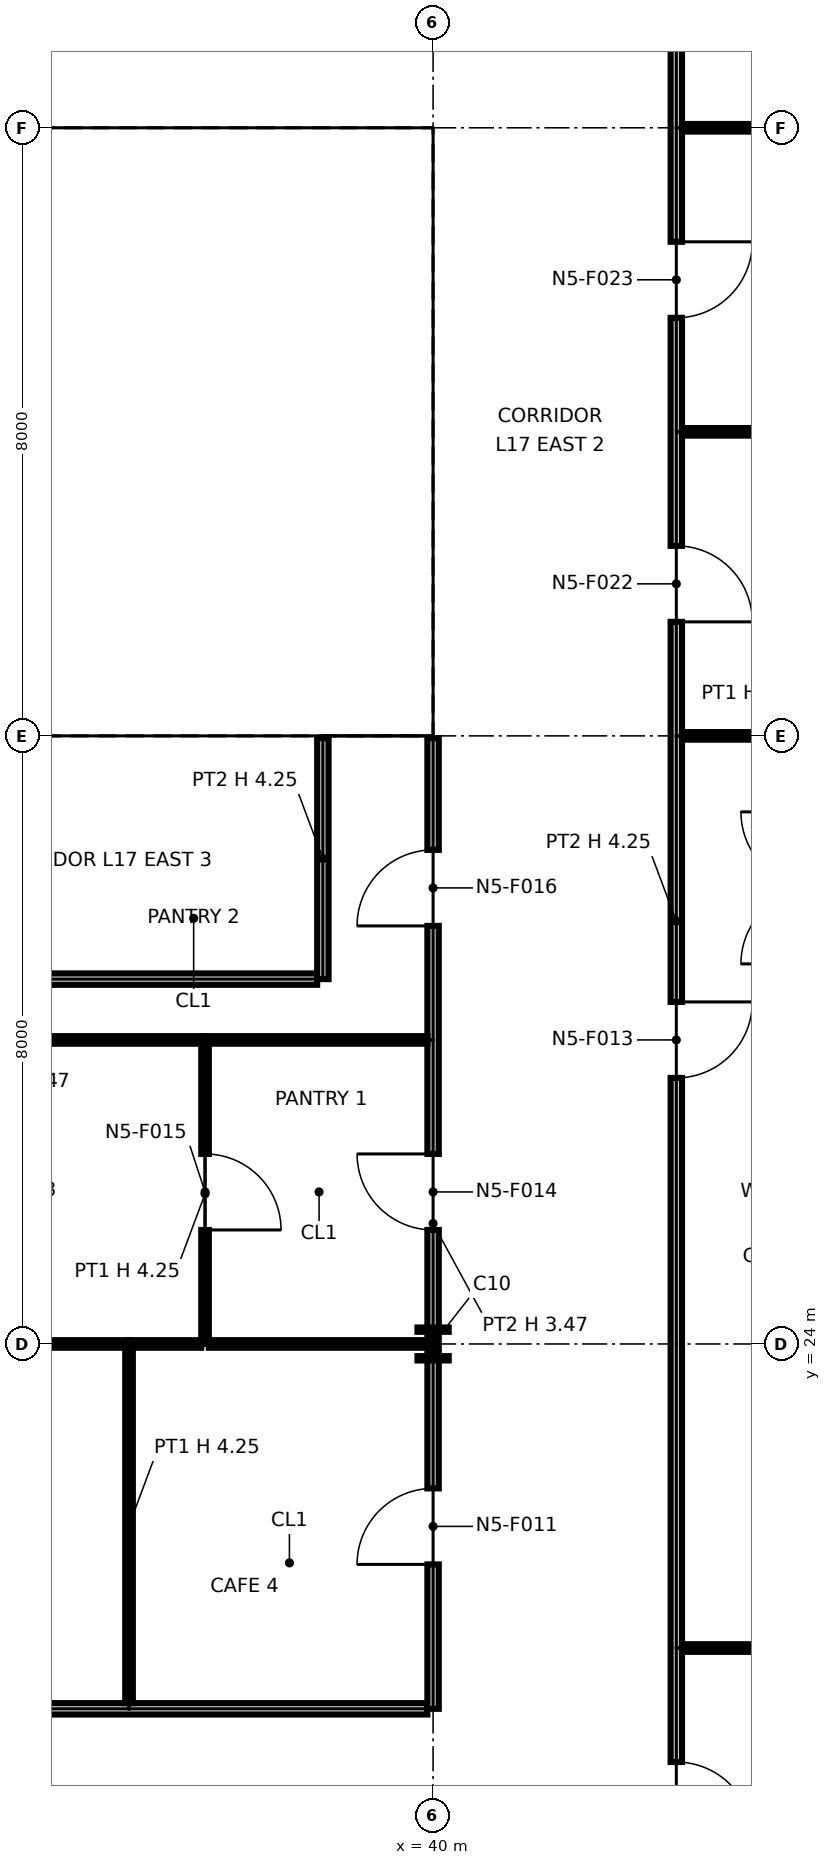
"""IFC4 building model, lengths in metres.
Left out: names, types, materials, properties, quantities, classifications, styles, units other than length and angle.
Written with IfcOpenShell. Run it as: python <this file> out.ifc"""

import sys

from ifc_helpers import new_model, si_unit, direction, frame, frame_2d, origin, origin_2d, place, context, subcontext, project, spatial, polyline, rectangle, i_section, outline, extrude, element, fill, save


model = new_model("IFC4")
c1 = context("Model", 3, precision=1e-05, world=origin(), true_north=direction((0.0, 1.0)))
c2 = subcontext(c1, "Body", "Model", "MODEL_VIEW")
j1 = project(units=[si_unit("LENGTHUNIT", "METRE"), si_unit("PLANEANGLEUNIT", "RADIAN")], contexts=[c1])
p1 = place(None, origin())
s1 = spatial("IfcSite", under=j1, at=p1, CompositionType="ELEMENT")
p2 = place(p1, origin())
s2 = spatial("IfcBuilding", under=s1, at=p2, CompositionType="ELEMENT")
p3 = place(p2, frame((0.0, 0.0, 92.0)))
s3 = spatial("IfcBuildingStorey", under=s2, at=p3, CompositionType="ELEMENT", Elevation=92.0)
p4 = place(p3, frame((40.0, 24.0, 0.0), z_axis=(0.0, 0.0, 1.0), x_axis=(1.0, 0.0, 0.0)))
e1 = element("IfcColumn", 1, at=p4, inside=s3, PredefinedType="COLUMN", context=c2, shape_type="SweptSolid", body=[
    extrude(i_section(OverallWidth=0.411, OverallDepth=0.434, WebThickness=0.036, FlangeThickness=0.057, at=origin_2d()), origin(), (0.0, 0.0, 1.0), 4.25),
])
for number, where, z_axis, x_axis in (
    (2, (40.0, 32.0, 0.0), (0.0, 0.0, 1.0), (1.0, 0.0, 0.0)),
    (3, (40.0, 40.0, 0.0), (0.0, 0.0, 1.0), (1.0, 0.0, 0.0)),
):
    element("IfcColumn", number, at=place(p3, frame(where, z_axis=z_axis, x_axis=x_axis)), inside=s3, PredefinedType="COLUMN", context=c2, shape_type="SweptSolid", body=[
        extrude(i_section(OverallWidth=0.257, OverallDepth=0.363, WebThickness=0.013, FlangeThickness=0.022, at=origin_2d()), origin(), (0.0, 0.0, 1.0), 4.25),
    ])
p5 = place(p3, frame((24.65, 32.75, 0.0), z_axis=(0.0, 0.0, 1.0), x_axis=(1.0, 0.0, 0.0)))
e4 = element("IfcWall", 4, at=p5, inside=s3, PredefinedType="PARTITIONING", context=c2, shape_type="SweptSolid", body=[
    extrude(outline(polyline([(0.0, 0.0), (14.7, 0.0), (14.7, 4.25), (7.469, 4.25), (7.469, 3.632), (7.231, 3.632), (7.23, 4.25), (0.0, 4.25), (0.0, 0.0)])), frame((0.0, 0.1, 0.0), z_axis=(0.0, -1.0, 0.0), x_axis=(1.0, 0.0, 0.0)), (0.0, 0.0, 1.0), 0.2),
])
p6 = place(p5, frame((4.1, 0.0, 0.0)))
e5 = element("IfcOpeningElement", 5, at=p6, cuts=e4, PredefinedType="OPENING", context=c2, shape_type="SweptSolid", body=[
    extrude(rectangle(XDim=1.8, YDim=2.1, at=frame_2d((0.9, 1.05))), frame((0.0, 0.11, 0.0), z_axis=(0.0, -1.0, 0.0), x_axis=(1.0, 0.0, 0.0)), (0.0, 0.0, 1.0), 0.22),
])
p7 = place(p5, frame((8.55, 0.0, 0.0)))
e6 = element("IfcOpeningElement", 6, at=p7, cuts=e4, PredefinedType="OPENING", context=c2, shape_type="SweptSolid", body=[
    extrude(rectangle(XDim=1.4, YDim=2.1, at=frame_2d((0.7, 1.05))), frame((0.0, 0.11, 0.0), z_axis=(0.0, -1.0, 0.0), x_axis=(1.0, 0.0, 0.0)), (0.0, 0.0, 1.0), 0.22),
])
p8 = place(p5, frame((12.0, 0.0, 0.0)))
e7 = element("IfcOpeningElement", 7, at=p8, cuts=e4, PredefinedType="OPENING", context=c2, shape_type="SweptSolid", body=[
    extrude(rectangle(XDim=1.4, YDim=2.1, at=frame_2d((0.7, 1.05))), frame((0.0, 0.11, 0.0), z_axis=(0.0, -1.0, 0.0), x_axis=(1.0, 0.0, 0.0)), (0.0, 0.0, 1.0), 0.22),
])
p9 = place(p3, frame((24.65, 39.25, 0.0), z_axis=(0.0, 0.0, 1.0), x_axis=(1.0, 0.0, 0.0)))
e8 = element("IfcWall", 8, at=p9, inside=s3, PredefinedType="PARTITIONING", context=c2, shape_type="SweptSolid", body=[
    extrude(outline(polyline([(0.0, 0.0), (14.7, 0.0), (14.7, 4.25), (7.469, 4.25), (7.469, 3.632), (7.231, 3.632), (7.23, 4.25), (0.0, 4.25), (0.0, 0.0)])), frame((0.0, 0.1, 0.0), z_axis=(0.0, -1.0, 0.0), x_axis=(1.0, 0.0, 0.0)), (0.0, 0.0, 1.0), 0.2),
])
for number, where, z_axis, x_axis in (
    (9, (35.6, 32.85, 0.0), (0.0, 0.0, 1.0), (0.0, 1.0, 0.0)),
    (10, (39.25, 32.85, 0.0), (0.0, 0.0, 1.0), (0.0, 1.0, 0.0)),
):
    element("IfcWall", number, at=place(p3, frame(where, z_axis=z_axis, x_axis=x_axis)), inside=s3, PredefinedType="PARTITIONING", context=c2, shape_type="SweptSolid", body=[
        extrude(rectangle(XDim=6.3, YDim=0.2, at=frame_2d((3.15, 0.0))), origin(), (0.0, 0.0, 1.0), 4.25),
    ])
p10 = place(p3, frame((43.2, 16.0, 0.0), z_axis=(0.0, 0.0, 1.0), x_axis=(0.0, 1.0, 0.0)))
e11 = element("IfcWall", 11, at=p10, inside=s3, PredefinedType="PARTITIONING", context=c2, shape_type="SweptSolid", body=[
    extrude(outline(polyline([(0.0, 0.0), (27.125, 0.0), (27.125, 4.25), (24.3, 4.25), (24.298, 3.47), (23.702, 3.47), (23.7, 4.25), (20.3, 4.25), (20.298, 3.47), (19.702, 3.47), (19.7, 4.25), (16.3, 4.25), (16.298, 3.47), (15.702, 3.47), (15.7, 4.25), (12.3, 4.25), (12.298, 3.47), (11.702, 3.47), (11.7, 4.25), (8.3, 4.25), (8.298, 3.47), (7.702, 3.47), (7.7, 4.25), (4.3, 4.25), (4.298, 3.47), (3.702, 3.47), (3.7, 4.25), (0.0, 4.25), (0.0, 0.0)])), frame((0.0, 0.075, 0.0), z_axis=(0.0, -1.0, 0.0), x_axis=(1.0, 0.0, 0.0)), (0.0, 0.0, 1.0), 0.15),
])
p11 = place(p10, frame((2.5, 0.0, 0.0), z_axis=(0.0, 0.0, 1.0), x_axis=(-1.0, 0.0, 0.0)))
e12 = element("IfcOpeningElement", 12, at=p11, cuts=e11, PredefinedType="OPENING", context=c2, shape_type="SweptSolid", body=[
    extrude(rectangle(XDim=1.0, YDim=2.1, at=frame_2d((0.5, 1.05))), frame((0.0, 0.085, 0.0), z_axis=(0.0, -1.0, 0.0), x_axis=(1.0, 0.0, 0.0)), (0.0, 0.0, 1.0), 0.17),
])
p12 = place(p10, frame((12.5, 0.0, 0.0), z_axis=(0.0, 0.0, 1.0), x_axis=(-1.0, 0.0, 0.0)))
e13 = element("IfcOpeningElement", 13, at=p12, cuts=e11, PredefinedType="OPENING", context=c2, shape_type="SweptSolid", body=[
    extrude(rectangle(XDim=1.0, YDim=2.1, at=frame_2d((0.5, 1.05))), frame((0.0, 0.085, 0.0), z_axis=(0.0, -1.0, 0.0), x_axis=(1.0, 0.0, 0.0)), (0.0, 0.0, 1.0), 0.17),
])
p13 = place(p10, frame((18.5, 0.0, 0.0), z_axis=(0.0, 0.0, 1.0), x_axis=(-1.0, 0.0, 0.0)))
e14 = element("IfcOpeningElement", 14, at=p13, cuts=e11, PredefinedType="OPENING", context=c2, shape_type="SweptSolid", body=[
    extrude(rectangle(XDim=1.0, YDim=2.1, at=frame_2d((0.5, 1.05))), frame((0.0, 0.085, 0.0), z_axis=(0.0, -1.0, 0.0), x_axis=(1.0, 0.0, 0.0)), (0.0, 0.0, 1.0), 0.17),
])
p14 = place(p10, frame((22.5, 0.0, 0.0), z_axis=(0.0, 0.0, 1.0), x_axis=(-1.0, 0.0, 0.0)))
e15 = element("IfcOpeningElement", 15, at=p14, cuts=e11, PredefinedType="OPENING", context=c2, shape_type="SweptSolid", body=[
    extrude(rectangle(XDim=1.0, YDim=2.1, at=frame_2d((0.5, 1.05))), frame((0.0, 0.085, 0.0), z_axis=(0.0, -1.0, 0.0), x_axis=(1.0, 0.0, 0.0)), (0.0, 0.0, 1.0), 0.17),
])
p15 = place(p10, frame((26.1, 0.0, 0.0), z_axis=(0.0, 0.0, 1.0), x_axis=(-1.0, 0.0, 0.0)))
e16 = element("IfcOpeningElement", 16, at=p15, cuts=e11, PredefinedType="OPENING", context=c2, shape_type="SweptSolid", body=[
    extrude(rectangle(XDim=1.0, YDim=2.1, at=frame_2d((0.5, 1.05))), frame((0.0, 0.085, 0.0), z_axis=(0.0, -1.0, 0.0), x_axis=(1.0, 0.0, 0.0)), (0.0, 0.0, 1.0), 0.17),
])
p16 = place(p3, frame((27.2, 19.2, 0.0), z_axis=(0.0, 0.0, 1.0), x_axis=(1.0, 0.0, 0.0)))
e17 = element("IfcWall", 17, at=p16, inside=s3, PredefinedType="PARTITIONING", context=c2, shape_type="SweptSolid", body=[
    extrude(rectangle(XDim=12.725, YDim=0.15, at=frame_2d((6.363, 0.0))), origin(), (0.0, 0.0, 1.0), 4.25),
])
p17 = place(p16, frame((1.9, 0.0, 0.0)))
e18 = element("IfcOpeningElement", 18, at=p17, cuts=e17, PredefinedType="OPENING", context=c2, shape_type="SweptSolid", body=[
    extrude(rectangle(XDim=1.0, YDim=2.1, at=frame_2d((0.5, 1.05))), frame((0.0, 0.085, 0.0), z_axis=(0.0, -1.0, 0.0), x_axis=(1.0, 0.0, 0.0)), (0.0, 0.0, 1.0), 0.17),
])
p18 = place(p16, frame((6.3, 0.0, 0.0)))
e19 = element("IfcOpeningElement", 19, at=p18, cuts=e17, PredefinedType="OPENING", context=c2, shape_type="SweptSolid", body=[
    extrude(rectangle(XDim=1.0, YDim=2.1, at=frame_2d((0.5, 1.05))), frame((0.0, 0.085, 0.0), z_axis=(0.0, -1.0, 0.0), x_axis=(1.0, 0.0, 0.0)), (0.0, 0.0, 1.0), 0.17),
])
p19 = place(p3, frame((36.0, 19.275, 0.0), z_axis=(0.0, 0.0, 1.0), x_axis=(0.0, 1.0, 0.0)))
e20 = element("IfcWall", 20, at=p19, inside=s3, PredefinedType="PARTITIONING", context=c2, shape_type="SweptSolid", body=[
    extrude(outline(polyline([(0.0, 0.0), (4.675, 0.0), (4.675, 4.25), (1.025, 4.25), (1.023, 3.47), (0.427, 3.47), (0.425, 4.25), (0.0, 4.25), (0.0, 0.0)])), frame((0.0, 0.05, 0.0), z_axis=(0.0, -1.0, 0.0), x_axis=(1.0, 0.0, 0.0)), (0.0, 0.0, 1.0), 0.1),
])
p20 = place(p3, frame((40.0, 19.2, 0.0), z_axis=(0.0, 0.0, 1.0), x_axis=(0.0, 1.0, 0.0)))
e21 = element("IfcWall", 21, at=p20, inside=s3, PredefinedType="PARTITIONING", context=c2, shape_type="SweptSolid", body=[
    extrude(rectangle(XDim=12.77, YDim=0.15, at=frame_2d((6.385, 0.0))), origin(), (0.0, 0.0, 1.0), 3.47),
])
p21 = place(p20, frame((1.9, 0.0, 0.0)))
e22 = element("IfcOpeningElement", 22, at=p21, cuts=e21, PredefinedType="OPENING", context=c2, shape_type="SweptSolid", body=[
    extrude(rectangle(XDim=1.0, YDim=2.1, at=frame_2d((0.5, 1.05))), frame((0.0, 0.085, 0.0), z_axis=(0.0, -1.0, 0.0), x_axis=(1.0, 0.0, 0.0)), (0.0, 0.0, 1.0), 0.17),
])
p22 = place(p20, frame((6.3, 0.0, 0.0)))
e23 = element("IfcOpeningElement", 23, at=p22, cuts=e21, PredefinedType="OPENING", context=c2, shape_type="SweptSolid", body=[
    extrude(rectangle(XDim=1.0, YDim=2.1, at=frame_2d((0.5, 1.05))), frame((0.0, 0.085, 0.0), z_axis=(0.0, -1.0, 0.0), x_axis=(1.0, 0.0, 0.0)), (0.0, 0.0, 1.0), 0.17),
])
p23 = place(p20, frame((10.3, 0.0, 0.0)))
e24 = element("IfcOpeningElement", 24, at=p23, cuts=e21, PredefinedType="OPENING", context=c2, shape_type="SweptSolid", body=[
    extrude(rectangle(XDim=1.0, YDim=2.1, at=frame_2d((0.5, 1.05))), frame((0.0, 0.085, 0.0), z_axis=(0.0, -1.0, 0.0), x_axis=(1.0, 0.0, 0.0)), (0.0, 0.0, 1.0), 0.17),
])
p24 = place(p3, frame((43.275, 20.0, 0.0), z_axis=(0.0, 0.0, 1.0), x_axis=(1.0, 0.0, 0.0)))
e25 = element("IfcWall", 25, at=p24, inside=s3, PredefinedType="PARTITIONING", context=c2, shape_type="SweptSolid", body=[
    extrude(rectangle(XDim=4.595, YDim=0.1, at=frame_2d((2.298, 0.0))), origin(), (0.0, 0.0, 1.0), 3.47),
])
p25 = place(p3, frame((32.05, 24.0, 0.0), z_axis=(0.0, 0.0, 1.0), x_axis=(1.0, 0.0, 0.0)))
e26 = element("IfcWall", 26, at=p25, inside=s3, PredefinedType="PARTITIONING", context=c2, shape_type="SweptSolid", body=[
    extrude(rectangle(XDim=3.95, YDim=0.1, at=frame_2d((1.975, 0.0))), origin(), (0.0, 0.0, 1.0), 3.47),
])
p26 = place(p3, frame((36.0, 24.0, 0.0), z_axis=(0.0, 0.0, 1.0), x_axis=(1.0, 0.0, 0.0)))
e27 = element("IfcWall", 27, at=p26, inside=s3, PredefinedType="PARTITIONING", context=c2, shape_type="SweptSolid", body=[
    extrude(rectangle(XDim=0.95, YDim=0.1, at=frame_2d((0.475, 0.0))), origin(), (0.0, 0.0, 1.0), 3.47),
])
p27 = place(p3, frame((37.05, 24.0, 0.0), z_axis=(0.0, 0.0, 1.0), x_axis=(1.0, 0.0, 0.0)))
e28 = element("IfcWall", 28, at=p27, inside=s3, PredefinedType="PARTITIONING", context=c2, shape_type="SweptSolid", body=[
    extrude(rectangle(XDim=2.875, YDim=0.1, at=frame_2d((1.438, 0.0))), origin(), (0.0, 0.0, 1.0), 3.47),
])
p28 = place(p3, frame((37.0, 24.0, 0.0), z_axis=(0.0, 0.0, 1.0), x_axis=(0.0, 1.0, 0.0)))
e29 = element("IfcWall", 29, at=p28, inside=s3, PredefinedType="PARTITIONING", context=c2, shape_type="SweptSolid", body=[
    extrude(rectangle(XDim=3.95, YDim=0.1, at=frame_2d((1.975, 0.0))), origin(), (0.0, 0.0, 1.0), 4.25),
])
p29 = place(p28, frame((2.5, 0.0, 0.0), z_axis=(0.0, 0.0, 1.0), x_axis=(-1.0, 0.0, 0.0)))
e30 = element("IfcOpeningElement", 30, at=p29, cuts=e29, PredefinedType="OPENING", context=c2, shape_type="SweptSolid", body=[
    extrude(rectangle(XDim=1.0, YDim=2.1, at=frame_2d((0.5, 1.05))), frame((0.0, 0.06, 0.0), z_axis=(0.0, -1.0, 0.0), x_axis=(1.0, 0.0, 0.0)), (0.0, 0.0, 1.0), 0.12),
])
p30 = place(p3, frame((32.05, 28.0, 0.0), z_axis=(0.0, 0.0, 1.0), x_axis=(1.0, 0.0, 0.0)))
e31 = element("IfcWall", 31, at=p30, inside=s3, PredefinedType="PARTITIONING", context=c2, shape_type="SweptSolid", body=[
    extrude(rectangle(XDim=4.95, YDim=0.1, at=frame_2d((2.475, 0.0))), origin(), (0.0, 0.0, 1.0), 3.47),
])
p31 = place(p3, frame((37.0, 28.0, 0.0), z_axis=(0.0, 0.0, 1.0), x_axis=(1.0, 0.0, 0.0)))
e32 = element("IfcWall", 32, at=p31, inside=s3, PredefinedType="PARTITIONING", context=c2, shape_type="SweptSolid", body=[
    extrude(rectangle(XDim=2.925, YDim=0.1, at=frame_2d((1.462, 0.0))), origin(), (0.0, 0.0, 1.0), 3.47),
])
p32 = place(p3, frame((28.325, 28.8, 0.0), z_axis=(0.0, 0.0, 1.0), x_axis=(1.0, 0.0, 0.0)))
e33 = element("IfcWall", 33, at=p32, inside=s3, PredefinedType="PARTITIONING", context=c2, shape_type="SweptSolid", body=[
    extrude(rectangle(XDim=10.15, YDim=0.15, at=frame_2d((5.075, 0.0))), origin(), (0.0, 0.0, 1.0), 4.25),
])
p33 = place(p3, frame((38.55, 28.8, 0.0), z_axis=(0.0, 0.0, 1.0), x_axis=(0.0, 1.0, 0.0)))
e34 = element("IfcWall", 34, at=p33, inside=s3, PredefinedType="PARTITIONING", context=c2, shape_type="SweptSolid", body=[
    extrude(rectangle(XDim=3.17, YDim=0.15, at=frame_2d((1.585, 0.0))), origin(), (0.0, 0.0, 1.0), 4.25),
])
p34 = place(p3, frame((43.275, 32.0, 0.0), z_axis=(0.0, 0.0, 1.0), x_axis=(1.0, 0.0, 0.0)))
e35 = element("IfcWall", 35, at=p34, inside=s3, PredefinedType="PARTITIONING", context=c2, shape_type="SweptSolid", body=[
    extrude(rectangle(XDim=1.895, YDim=0.1, at=frame_2d((0.948, 0.0))), origin(), (0.0, 0.0, 1.0), 3.47),
])
for number, where, z_axis, x_axis in (
    (36, (43.275, 36.0, 0.0), (0.0, 0.0, 1.0), (1.0, 0.0, 0.0)),
    (37, (43.275, 40.0, 0.0), (0.0, 0.0, 1.0), (1.0, 0.0, 0.0)),
):
    element("IfcWall", number, at=place(p3, frame(where, z_axis=z_axis, x_axis=x_axis)), inside=s3, PredefinedType="PARTITIONING", context=c2, shape_type="SweptSolid", body=[
        extrude(rectangle(XDim=4.595, YDim=0.1, at=frame_2d((2.298, 0.0))), origin(), (0.0, 0.0, 1.0), 3.47),
    ])
p35 = place(p8, origin())
e38 = element("IfcDoor", 38, at=p35, inside=s3, OperationType="DOUBLE_DOOR_SINGLE_SWING", PredefinedType="NOTDEFINED", context=c2, shape_type="SweptSolid", body=[
    extrude(rectangle(XDim=1.4, YDim=2.1, at=frame_2d((0.7, 1.05))), frame((0.0, 0.025, 0.0), z_axis=(0.0, -1.0, 0.0), x_axis=(1.0, 0.0, 0.0)), (0.0, 0.0, 1.0), 0.05),
])
fill(e7, e38)
p36 = place(p21, origin())
e39 = element("IfcDoor", 39, at=p36, inside=s3, OperationType="SINGLE_SWING_LEFT", PredefinedType="DOOR", context=c2, shape_type="SweptSolid", body=[
    extrude(rectangle(XDim=1.0, YDim=2.1, at=frame_2d((0.5, 1.05))), frame((0.0, 0.025, 0.0), z_axis=(0.0, -1.0, 0.0), x_axis=(1.0, 0.0, 0.0)), (0.0, 0.0, 1.0), 0.05),
])
fill(e22, e39)
p37 = place(p11, origin())
e40 = element("IfcDoor", 40, at=p37, inside=s3, OperationType="SINGLE_SWING_RIGHT", PredefinedType="DOOR", context=c2, shape_type="SweptSolid", body=[
    extrude(rectangle(XDim=1.0, YDim=2.1, at=frame_2d((0.5, 1.05))), frame((0.0, 0.025, 0.0), z_axis=(0.0, -1.0, 0.0), x_axis=(1.0, 0.0, 0.0)), (0.0, 0.0, 1.0), 0.05),
])
fill(e12, e40)
p38 = place(p12, origin())
e41 = element("IfcDoor", 41, at=p38, inside=s3, OperationType="SINGLE_SWING_LEFT", PredefinedType="DOOR", context=c2, shape_type="SweptSolid", body=[
    extrude(rectangle(XDim=1.0, YDim=2.1, at=frame_2d((0.5, 1.05))), frame((0.0, 0.025, 0.0), z_axis=(0.0, -1.0, 0.0), x_axis=(1.0, 0.0, 0.0)), (0.0, 0.0, 1.0), 0.05),
])
fill(e13, e41)
p39 = place(p22, origin())
e42 = element("IfcDoor", 42, at=p39, inside=s3, OperationType="SINGLE_SWING_RIGHT", PredefinedType="DOOR", context=c2, shape_type="SweptSolid", body=[
    extrude(rectangle(XDim=1.0, YDim=2.1, at=frame_2d((0.5, 1.05))), frame((0.0, 0.025, 0.0), z_axis=(0.0, -1.0, 0.0), x_axis=(1.0, 0.0, 0.0)), (0.0, 0.0, 1.0), 0.05),
])
fill(e23, e42)
p40 = place(p29, origin())
e43 = element("IfcDoor", 43, at=p40, inside=s3, OperationType="SINGLE_SWING_RIGHT", PredefinedType="DOOR", context=c2, shape_type="SweptSolid", body=[
    extrude(rectangle(XDim=1.0, YDim=2.1, at=frame_2d((0.5, 1.05))), frame((0.0, 0.025, 0.0), z_axis=(0.0, -1.0, 0.0), x_axis=(1.0, 0.0, 0.0)), (0.0, 0.0, 1.0), 0.05),
])
fill(e30, e43)
p41 = place(p23, origin())
e44 = element("IfcDoor", 44, at=p41, inside=s3, OperationType="SINGLE_SWING_LEFT", PredefinedType="DOOR", context=c2, shape_type="SweptSolid", body=[
    extrude(rectangle(XDim=1.0, YDim=2.1, at=frame_2d((0.5, 1.05))), frame((0.0, 0.025, 0.0), z_axis=(0.0, -1.0, 0.0), x_axis=(1.0, 0.0, 0.0)), (0.0, 0.0, 1.0), 0.05),
])
fill(e24, e44)
p42 = place(p13, origin())
e45 = element("IfcDoor", 45, at=p42, inside=s3, OperationType="SINGLE_SWING_RIGHT", PredefinedType="DOOR", context=c2, shape_type="SweptSolid", body=[
    extrude(rectangle(XDim=1.0, YDim=2.1, at=frame_2d((0.5, 1.05))), frame((0.0, 0.025, 0.0), z_axis=(0.0, -1.0, 0.0), x_axis=(1.0, 0.0, 0.0)), (0.0, 0.0, 1.0), 0.05),
])
fill(e14, e45)
p43 = place(p14, origin())
e46 = element("IfcDoor", 46, at=p43, inside=s3, OperationType="SINGLE_SWING_LEFT", PredefinedType="DOOR", context=c2, shape_type="SweptSolid", body=[
    extrude(rectangle(XDim=1.0, YDim=2.1, at=frame_2d((0.5, 1.05))), frame((0.0, 0.025, 0.0), z_axis=(0.0, -1.0, 0.0), x_axis=(1.0, 0.0, 0.0)), (0.0, 0.0, 1.0), 0.05),
])
fill(e15, e46)
save(model, sys.argv[1])
